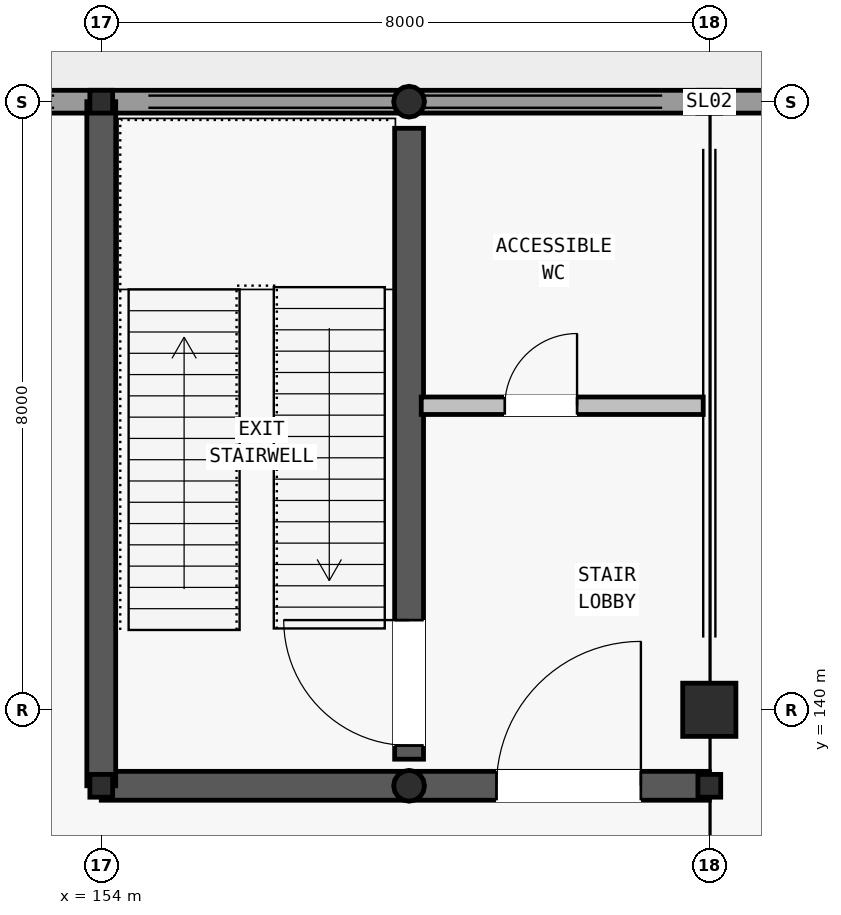
"""IFC4 building model, lengths in metres.
Left out: names, types, materials, properties, quantities, classifications, styles, units other than length and angle.
Written with IfcOpenShell. Run it as: python <this file> out.ifc"""

import sys

from ifc_helpers import new_model, si_unit, direction, frame, frame_2d, origin, origin_2d, place, context, subcontext, project, spatial, rectangle, hollow_circle, i_section, extrude, element, fill, save


model = new_model("IFC4")
c1 = context("Model", 3, precision=1e-05, world=origin(), true_north=direction((0.0, 1.0)))
c2 = subcontext(c1, "Body", "Model", "MODEL_VIEW")
j1 = project(units=[si_unit("LENGTHUNIT", "METRE"), si_unit("PLANEANGLEUNIT", "RADIAN")], contexts=[c1])
p1 = place(None, origin())
s1 = spatial("IfcSite", under=j1, at=p1, CompositionType="ELEMENT")
p2 = place(p1, origin())
s2 = spatial("IfcBuilding", under=s1, at=p2, CompositionType="ELEMENT")
p3 = place(p2, origin())
s3 = spatial("IfcBuildingStorey", under=s2, at=p3, CompositionType="ELEMENT", Elevation=0.0)
for number, where, z_axis, x_axis in (
    (1, (154.0, 148.0, -0.9), (0.0, 0.0, 1.0), (1.0, 0.0, 0.0)),
    (2, (162.0, 148.0, -0.9), (0.0, 0.0, 1.0), (1.0, 0.0, 0.0)),
    (3, (154.0, 139.0, -0.9), (0.0, 0.0, 1.0), (1.0, 0.0, 0.0)),
    (4, (162.0, 139.0, -0.9), (0.0, 0.0, 1.0), (1.0, 0.0, 0.0)),
):
    element("IfcColumn", number, at=place(p3, frame(where, z_axis=z_axis, x_axis=x_axis)), inside=s3, PredefinedType="COLUMN", context=c2, shape_type="SweptSolid", body=[
        extrude(i_section(OverallWidth=0.3, OverallDepth=0.3, WebThickness=0.01, FlangeThickness=0.015, FilletRadius=0.018, at=origin_2d()), origin(), (0.0, 0.0, 1.0), 6.5),
    ])
for number, where, z_axis, x_axis in (
    (5, (158.05, 139.0, -0.9), (0.0, 0.0, 1.0), (1.0, 0.0, 0.0)),
    (6, (158.05, 148.0, -0.9), (0.0, 0.0, 1.0), (1.0, 0.0, 0.0)),
):
    element("IfcColumn", number, at=place(p3, frame(where, z_axis=z_axis, x_axis=x_axis)), inside=s3, PredefinedType="COLUMN", context=c2, shape_type="SweptSolid", body=[
        extrude(hollow_circle(Radius=0.203, WallThickness=0.014, at=origin_2d()), origin(), (0.0, 0.0, 1.0), 6.5),
    ])
p4 = place(p3, frame((162.0, 140.0, -0.9), z_axis=(0.0, 0.0, 1.0), x_axis=(1.0, 0.0, 0.0)))
e7 = element("IfcColumn", 7, at=p4, inside=s3, PredefinedType="COLUMN", context=c2, shape_type="SweptSolid", body=[
    extrude(rectangle(XDim=0.7, YDim=0.7, at=origin_2d()), origin(), (0.0, 0.0, 1.0), 6.5),
])
p5 = place(p3, frame((22.0, 148.0, -0.9), z_axis=(0.0, 0.0, 1.0), x_axis=(1.0, 0.0, 0.0)))
e8 = element("IfcWall", 8, at=p5, inside=s3, PredefinedType="STANDARD", context=c2, shape_type="SweptSolid", body=[
    extrude(rectangle(XDim=188.0, YDim=0.3, at=frame_2d((94.0, 0.0))), origin(), (0.0, 0.0, 1.0), 0.9),
])
p6 = place(p3, frame((154.0, 139.0, -0.9), z_axis=(0.0, 0.0, 1.0), x_axis=(1.0, 0.0, 0.0)))
e9 = element("IfcWall", 9, at=p6, inside=s3, PredefinedType="SHEAR", context=c2, shape_type="SweptSolid", body=[
    extrude(rectangle(XDim=8.0, YDim=0.38, at=frame_2d((4.0, 0.0))), origin(), (0.0, 0.0, 1.0), 6.22),
])
p7 = place(p6, frame((5.2, 0.0, 0.9)))
e10 = element("IfcOpeningElement", 10, at=p7, cuts=e9, PredefinedType="OPENING", context=c2, shape_type="SweptSolid", body=[
    extrude(rectangle(XDim=1.9, YDim=2.3, at=frame_2d((0.95, 1.15))), frame((0.0, 0.2, 0.0), z_axis=(0.0, -1.0, 0.0), x_axis=(1.0, 0.0, 0.0)), (0.0, 0.0, 1.0), 0.4),
])
p8 = place(p3, frame((154.0, 148.0, -0.9), z_axis=(0.0, 0.0, 1.0), x_axis=(0.0, -1.0, 0.0)))
e11 = element("IfcWall", 11, at=p8, inside=s3, PredefinedType="SHEAR", context=c2, shape_type="SweptSolid", body=[
    extrude(rectangle(XDim=9.0, YDim=0.38, at=frame_2d((4.5, 0.0))), origin(), (0.0, 0.0, 1.0), 6.22),
])
p9 = place(p3, frame((158.05, 139.35, -0.9), z_axis=(0.0, 0.0, 1.0), x_axis=(0.0, 1.0, 0.0)))
e12 = element("IfcWall", 12, at=p9, inside=s3, PredefinedType="SHEAR", context=c2, shape_type="SweptSolid", body=[
    extrude(rectangle(XDim=8.3, YDim=0.38, at=frame_2d((4.15, 0.0))), origin(), (0.0, 0.0, 1.0), 6.22),
])
p10 = place(p9, frame((0.18, 0.0, 0.9)))
e13 = element("IfcOpeningElement", 13, at=p10, cuts=e12, PredefinedType="OPENING", context=c2, shape_type="SweptSolid", body=[
    extrude(rectangle(XDim=1.65, YDim=2.2, at=frame_2d((0.825, 1.1))), frame((0.0, 0.2, 0.0), z_axis=(0.0, -1.0, 0.0), x_axis=(1.0, 0.0, 0.0)), (0.0, 0.0, 1.0), 0.4),
])
p11 = place(p3, frame((158.21, 144.0, 0.0), z_axis=(0.0, 0.0, 1.0), x_axis=(1.0, 0.0, 0.0)))
e14 = element("IfcWall", 14, at=p11, inside=s3, PredefinedType="PARTITIONING", context=c2, shape_type="SweptSolid", body=[
    extrude(rectangle(XDim=3.71, YDim=0.23, at=frame_2d((1.855, 0.0))), origin(), (0.0, 0.0, 1.0), 4.2),
])
p12 = place(p11, frame((1.1, 0.0, 0.0)))
e15 = element("IfcOpeningElement", 15, at=p12, cuts=e14, PredefinedType="OPENING", context=c2, shape_type="SweptSolid", body=[
    extrude(rectangle(XDim=0.95, YDim=2.1, at=frame_2d((0.475, 1.05))), frame((0.0, 0.125, 0.0), z_axis=(0.0, -1.0, 0.0), x_axis=(1.0, 0.0, 0.0)), (0.0, 0.0, 1.0), 0.25),
])
p13 = place(p7, origin())
e16 = element("IfcDoor", 16, at=p13, inside=s3, OperationType="SINGLE_SWING_RIGHT", PredefinedType="DOOR", context=c2, shape_type="SweptSolid", body=[
    extrude(rectangle(XDim=1.9, YDim=2.3, at=frame_2d((0.95, 1.15))), frame((0.0, 0.025, 0.0), z_axis=(0.0, -1.0, 0.0), x_axis=(1.0, 0.0, 0.0)), (0.0, 0.0, 1.0), 0.05),
])
fill(e10, e16)
p14 = place(p10, origin())
e17 = element("IfcDoor", 17, at=p14, inside=s3, OperationType="SINGLE_SWING_RIGHT", PredefinedType="DOOR", context=c2, shape_type="SweptSolid", body=[
    extrude(rectangle(XDim=1.65, YDim=2.2, at=frame_2d((0.825, 1.1))), frame((0.0, 0.025, 0.0), z_axis=(0.0, -1.0, 0.0), x_axis=(1.0, 0.0, 0.0)), (0.0, 0.0, 1.0), 0.05),
])
fill(e13, e17)
p15 = place(p12, origin())
e18 = element("IfcDoor", 18, at=p15, inside=s3, OperationType="SINGLE_SWING_RIGHT", PredefinedType="DOOR", context=c2, shape_type="SweptSolid", body=[
    extrude(rectangle(XDim=0.95, YDim=2.1, at=frame_2d((0.475, 1.05))), frame((0.0, 0.025, 0.0), z_axis=(0.0, -1.0, 0.0), x_axis=(1.0, 0.0, 0.0)), (0.0, 0.0, 1.0), 0.05),
])
fill(e15, e18)
save(model, sys.argv[1])
